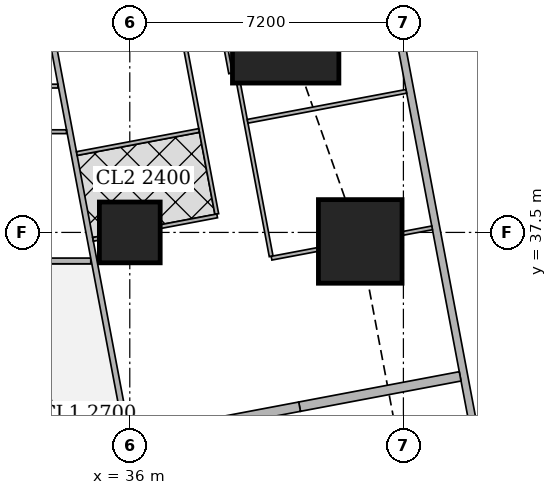
"""IFC4 building model, lengths in metres.
Left out: names, types, materials, properties, quantities, classifications, styles, units other than length and angle.
Written with IfcOpenShell. Run it as: python <this file> out.ifc"""

import sys

from ifc_helpers import new_model, si_unit, direction, frame, frame_2d, origin, origin_2d, place, context, subcontext, project, spatial, rectangle, extrude, element, fill, save


model = new_model("IFC4")
c1 = context("Model", 3, precision=1e-05, world=origin(), true_north=direction((0.0, 1.0)))
c2 = subcontext(c1, "Body", "Model", "MODEL_VIEW")
j1 = project(units=[si_unit("LENGTHUNIT", "METRE"), si_unit("PLANEANGLEUNIT", "RADIAN")], contexts=[c1])
p1 = place(None, origin())
s1 = spatial("IfcSite", under=j1, at=p1, CompositionType="ELEMENT")
p2 = place(p1, origin())
s2 = spatial("IfcBuilding", under=s1, at=p2, CompositionType="ELEMENT")
p3 = place(p2, frame((0.0, 0.0, 100.4)))
s3 = spatial("IfcBuildingStorey", under=s2, at=p3, CompositionType="ELEMENT", Elevation=100.4)
p4 = place(p3, frame((36.0, 37.5, 0.0), z_axis=(0.0, 0.0, 1.0), x_axis=(1.0, 0.0, 0.0)))
e1 = element("IfcColumn", 1, at=p4, inside=s3, PredefinedType="COLUMN", context=c2, shape_type="SweptSolid", body=[
    extrude(rectangle(XDim=1.6, YDim=1.6, at=origin_2d()), origin(), (0.0, 0.0, 1.0), 3.75),
])
p5 = place(p3, frame((42.064, 37.263, 0.0), z_axis=(0.0, 0.0, 1.0), x_axis=(1.0, 0.0, 0.0)))
e2 = element("IfcColumn", 2, at=p5, inside=s3, PredefinedType="COLUMN", context=c2, shape_type="SweptSolid", body=[
    extrude(rectangle(XDim=2.2, YDim=2.2, at=origin_2d()), origin(), (0.0, 0.0, 1.0), 3.75),
])
p6 = place(p3, frame((40.102, 42.83, 0.0), z_axis=(0.0, 0.0, 1.0), x_axis=(1.0, 0.0, 0.0)))
e3 = element("IfcColumn", 3, at=p6, inside=s3, PredefinedType="COLUMN", context=c2, shape_type="SweptSolid", body=[
    extrude(rectangle(XDim=2.8, YDim=2.8, at=origin_2d()), origin(), (0.0, 0.0, 1.0), 3.75),
])
p7 = place(p3, frame((50.653, 2.703, 0.0), z_axis=(0.0, 0.0, 1.0), x_axis=(-0.185612026696, 0.982623109613, 0.0)))
e4 = element("IfcWall", 4, at=p7, inside=s3, PredefinedType="SOLIDWALL", context=c2, shape_type="SweptSolid", body=[
    extrude(rectangle(XDim=41.393, YDim=0.2, at=frame_2d((20.697, 0.0))), origin(), (0.0, 0.0, 1.0), 3.5),
])
p8 = place(p7, frame((1.633, 0.0, 0.9)))
e5 = element("IfcOpeningElement", 5, at=p8, cuts=e4, PredefinedType="OPENING", context=c2, shape_type="SweptSolid", body=[
    extrude(rectangle(XDim=1.8, YDim=1.5, at=frame_2d((0.9, 0.75))), frame((0.0, 0.11, 0.0), z_axis=(0.0, -1.0, 0.0), x_axis=(1.0, 0.0, 0.0)), (0.0, 0.0, 1.0), 0.22),
])
p9 = place(p7, frame((6.032, 0.0, 0.9)))
e6 = element("IfcOpeningElement", 6, at=p9, cuts=e4, PredefinedType="OPENING", context=c2, shape_type="SweptSolid", body=[
    extrude(rectangle(XDim=1.8, YDim=1.5, at=frame_2d((0.9, 0.75))), frame((0.0, 0.11, 0.0), z_axis=(0.0, -1.0, 0.0), x_axis=(1.0, 0.0, 0.0)), (0.0, 0.0, 1.0), 0.22),
])
p10 = place(p7, frame((9.848, 0.0, 0.9)))
e7 = element("IfcOpeningElement", 7, at=p10, cuts=e4, PredefinedType="OPENING", context=c2, shape_type="SweptSolid", body=[
    extrude(rectangle(XDim=1.8, YDim=1.5, at=frame_2d((0.9, 0.75))), frame((0.0, 0.11, 0.0), z_axis=(0.0, -1.0, 0.0), x_axis=(1.0, 0.0, 0.0)), (0.0, 0.0, 1.0), 0.22),
])
p11 = place(p7, frame((13.664, 0.0, 0.9)))
e8 = element("IfcOpeningElement", 8, at=p11, cuts=e4, PredefinedType="OPENING", context=c2, shape_type="SweptSolid", body=[
    extrude(rectangle(XDim=1.8, YDim=1.5, at=frame_2d((0.9, 0.75))), frame((0.0, 0.11, 0.0), z_axis=(0.0, -1.0, 0.0), x_axis=(1.0, 0.0, 0.0)), (0.0, 0.0, 1.0), 0.22),
])
p12 = place(p7, frame((17.481, 0.0, 0.9)))
e9 = element("IfcOpeningElement", 9, at=p12, cuts=e4, PredefinedType="OPENING", context=c2, shape_type="SweptSolid", body=[
    extrude(rectangle(XDim=1.8, YDim=1.5, at=frame_2d((0.9, 0.75))), frame((0.0, 0.11, 0.0), z_axis=(0.0, -1.0, 0.0), x_axis=(1.0, 0.0, 0.0)), (0.0, 0.0, 1.0), 0.22),
])
p13 = place(p7, frame((21.297, 0.0, 0.9)))
e10 = element("IfcOpeningElement", 10, at=p13, cuts=e4, PredefinedType="OPENING", context=c2, shape_type="SweptSolid", body=[
    extrude(rectangle(XDim=1.8, YDim=1.5, at=frame_2d((0.9, 0.75))), frame((0.0, 0.11, 0.0), z_axis=(0.0, -1.0, 0.0), x_axis=(1.0, 0.0, 0.0)), (0.0, 0.0, 1.0), 0.22),
])
p14 = place(p7, frame((25.113, 0.0, 0.9)))
e11 = element("IfcOpeningElement", 11, at=p14, cuts=e4, PredefinedType="OPENING", context=c2, shape_type="SweptSolid", body=[
    extrude(rectangle(XDim=1.8, YDim=1.5, at=frame_2d((0.9, 0.75))), frame((0.0, 0.11, 0.0), z_axis=(0.0, -1.0, 0.0), x_axis=(1.0, 0.0, 0.0)), (0.0, 0.0, 1.0), 0.22),
])
p15 = place(p7, frame((28.93, 0.0, 0.9)))
e12 = element("IfcOpeningElement", 12, at=p15, cuts=e4, PredefinedType="OPENING", context=c2, shape_type="SweptSolid", body=[
    extrude(rectangle(XDim=1.8, YDim=1.5, at=frame_2d((0.9, 0.75))), frame((0.0, 0.11, 0.0), z_axis=(0.0, -1.0, 0.0), x_axis=(1.0, 0.0, 0.0)), (0.0, 0.0, 1.0), 0.22),
])
p16 = place(p7, frame((32.746, 0.0, 0.9)))
e13 = element("IfcOpeningElement", 13, at=p16, cuts=e4, PredefinedType="OPENING", context=c2, shape_type="SweptSolid", body=[
    extrude(rectangle(XDim=1.8, YDim=1.5, at=frame_2d((0.9, 0.75))), frame((0.0, 0.11, 0.0), z_axis=(0.0, -1.0, 0.0), x_axis=(1.0, 0.0, 0.0)), (0.0, 0.0, 1.0), 0.22),
])
p17 = place(p7, frame((36.481, 0.0, 0.9)))
e14 = element("IfcOpeningElement", 14, at=p17, cuts=e4, PredefinedType="OPENING", context=c2, shape_type="SweptSolid", body=[
    extrude(rectangle(XDim=1.8, YDim=1.5, at=frame_2d((0.9, 0.75))), frame((0.0, 0.11, 0.0), z_axis=(0.0, -1.0, 0.0), x_axis=(1.0, 0.0, 0.0)), (0.0, 0.0, 1.0), 0.22),
])
p18 = place(p3, frame((29.601, 36.75, 0.0), z_axis=(0.0, 0.0, 1.0), x_axis=(1.0, 0.0, 0.0)))
e15 = element("IfcWall", 15, at=p18, inside=s3, PredefinedType="SOLIDWALL", context=c2, shape_type="SweptSolid", body=[
    extrude(rectangle(XDim=5.372, YDim=0.15, at=frame_2d((2.686, 0.0))), origin(), (0.0, 0.0, 1.0), 3.5),
])
p19 = place(p3, frame((33.382, 45.65, 0.0), z_axis=(0.0, 0.0, 1.0), x_axis=(0.185593544777, -0.982626600565, 0.0)))
e16 = element("IfcWall", 16, at=p19, inside=s3, PredefinedType="SOLIDWALL", context=c2, shape_type="SweptSolid", body=[
    extrude(rectangle(XDim=47.118, YDim=0.15, at=frame_2d((23.559, 0.0))), origin(), (0.0, 0.0, 1.0), 2.2),
])
p20 = place(p19, frame((10.662, 0.0, 0.0)))
e17 = element("IfcOpeningElement", 17, at=p20, cuts=e16, PredefinedType="OPENING", context=c2, shape_type="SweptSolid", body=[
    extrude(rectangle(XDim=1.0, YDim=2.1, at=frame_2d((0.5, 1.05))), frame((0.0, 0.085, 0.0), z_axis=(0.0, -1.0, 0.0), x_axis=(1.0, 0.0, 0.0)), (0.0, 0.0, 1.0), 0.17),
])
p21 = place(p19, frame((15.237, 0.0, 0.0)))
e18 = element("IfcOpeningElement", 18, at=p21, cuts=e16, PredefinedType="OPENING", context=c2, shape_type="SweptSolid", body=[
    extrude(rectangle(XDim=1.0, YDim=2.1, at=frame_2d((0.5, 1.05))), frame((0.0, 0.085, 0.0), z_axis=(0.0, -1.0, 0.0), x_axis=(1.0, 0.0, 0.0)), (0.0, 0.0, 1.0), 0.17),
])
p22 = place(p19, frame((27.341, 0.0, 0.0)))
e19 = element("IfcOpeningElement", 19, at=p22, cuts=e16, PredefinedType="OPENING", context=c2, shape_type="SweptSolid", body=[
    extrude(rectangle(XDim=1.0, YDim=2.1, at=frame_2d((0.5, 1.05))), frame((0.0, 0.085, 0.0), z_axis=(0.0, -1.0, 0.0), x_axis=(1.0, 0.0, 0.0)), (0.0, 0.0, 1.0), 0.17),
])
p23 = place(p19, frame((33.833, 0.0, 0.0)))
e20 = element("IfcOpeningElement", 20, at=p23, cuts=e16, PredefinedType="OPENING", context=c2, shape_type="SweptSolid", body=[
    extrude(rectangle(XDim=1.0, YDim=2.1, at=frame_2d((0.5, 1.05))), frame((0.0, 0.085, 0.0), z_axis=(0.0, -1.0, 0.0), x_axis=(1.0, 0.0, 0.0)), (0.0, 0.0, 1.0), 0.17),
])
p24 = place(p3, frame((38.654, 41.686, 0.0), z_axis=(0.0, 0.0, 1.0), x_axis=(-0.185676896978, 0.982610853761, 0.0)))
e21 = element("IfcWall", 21, at=p24, inside=s3, PredefinedType="PARTITIONING", context=c2, shape_type="SweptSolid", body=[
    extrude(rectangle(XDim=4.034, YDim=0.1, at=frame_2d((2.017, 0.0))), origin(), (0.0, 0.0, 1.0), 2.05),
])
p25 = place(p3, frame((38.862, 41.42, 0.0), z_axis=(0.0, 0.0, 1.0), x_axis=(0.185332907641, -0.982675792592, 0.0)))
e22 = element("IfcWall", 22, at=p25, inside=s3, PredefinedType="PARTITIONING", context=c2, shape_type="SweptSolid", body=[
    extrude(rectangle(XDim=4.629, YDim=0.1, at=frame_2d((2.314, 0.0))), origin(), (0.0, 0.0, 1.0), 3.5),
])
p26 = place(p25, frame((2.22, 0.0, 0.0)))
e23 = element("IfcOpeningElement", 23, at=p26, cuts=e22, PredefinedType="OPENING", context=c2, shape_type="SweptSolid", body=[
    extrude(rectangle(XDim=0.9, YDim=2.1, at=frame_2d((0.45, 1.05))), frame((0.0, 0.06, 0.0), z_axis=(0.0, -1.0, 0.0), x_axis=(1.0, 0.0, 0.0)), (0.0, 0.0, 1.0), 0.12),
])
p27 = place(p3, frame((37.472, 42.309, 0.0), z_axis=(0.0, 0.0, 1.0), x_axis=(0.185641287362, -0.982617581985, 0.0)))
e24 = element("IfcWall", 24, at=p27, inside=s3, PredefinedType="PARTITIONING", context=c2, shape_type="SweptSolid", body=[
    extrude(rectangle(XDim=4.402, YDim=0.1, at=frame_2d((2.201, 0.0))), origin(), (0.0, 0.0, 1.0), 3.5),
])
p28 = place(p27, frame((2.854, 0.0, 0.0)))
e25 = element("IfcOpeningElement", 25, at=p28, cuts=e24, PredefinedType="OPENING", context=c2, shape_type="SweptSolid", body=[
    extrude(rectangle(XDim=0.9, YDim=2.1, at=frame_2d((0.45, 1.05))), frame((0.0, 0.06, 0.0), z_axis=(0.0, -1.0, 0.0), x_axis=(1.0, 0.0, 0.0)), (0.0, 0.0, 1.0), 0.12),
])
p29 = place(p3, frame((43.277, 41.212, 0.0), z_axis=(0.0, 0.0, 1.0), x_axis=(-0.982665405803, -0.185387972203, 0.0)))
e26 = element("IfcWall", 26, at=p29, inside=s3, PredefinedType="PARTITIONING", context=c2, shape_type="SweptSolid", body=[
    extrude(rectangle(XDim=4.25, YDim=0.1, at=frame_2d((2.125, 0.0))), origin(), (0.0, 0.0, 1.0), 2.05),
])
p30 = place(p3, frame((43.955, 37.62, 0.0), z_axis=(0.0, 0.0, 1.0), x_axis=(-0.98247004097, -0.186420542316, 0.0)))
e27 = element("IfcWall", 27, at=p30, inside=s3, PredefinedType="PARTITIONING", context=c2, shape_type="SweptSolid", body=[
    extrude(rectangle(XDim=0.795, YDim=0.1, at=frame_2d((0.397, 0.0))), origin(), (0.0, 0.0, 1.0), 2.05),
])
p31 = place(p3, frame((40.954, 37.053, 0.0), z_axis=(0.0, 0.0, 1.0), x_axis=(-0.982663001154, -0.185400717808, 0.0)))
e28 = element("IfcWall", 28, at=p31, inside=s3, PredefinedType="PARTITIONING", context=c2, shape_type="SweptSolid", body=[
    extrude(rectangle(XDim=1.246, YDim=0.1, at=frame_2d((0.623, 0.0))), origin(), (0.0, 0.0, 1.0), 2.05),
])
p32 = place(p3, frame((37.823, 40.182, 0.0), z_axis=(0.0, 0.0, 1.0), x_axis=(-0.982664729897, -0.18539155487, 0.0)))
e29 = element("IfcWall", 29, at=p32, inside=s3, PredefinedType="PARTITIONING", context=c2, shape_type="SweptSolid", body=[
    extrude(rectangle(XDim=3.274, YDim=0.1, at=frame_2d((1.637, 0.0))), origin(), (0.0, 0.0, 1.0), 3.5),
])
p33 = place(p3, frame((38.299, 37.935, 0.0), z_axis=(0.0, 0.0, 1.0), x_axis=(-0.982536828695, -0.186068213993, 0.0)))
e30 = element("IfcWall", 30, at=p33, inside=s3, PredefinedType="PARTITIONING", context=c2, shape_type="SweptSolid", body=[
    extrude(rectangle(XDim=1.515, YDim=0.1, at=frame_2d((0.758, 0.0))), origin(), (0.0, 0.0, 1.0), 3.5),
])
p34 = place(p3, frame((35.19, 37.347, 0.0), z_axis=(0.0, 0.0, 1.0), x_axis=(-0.982404955251, -0.186763229514, 0.0)))
e31 = element("IfcWall", 31, at=p34, inside=s3, PredefinedType="PARTITIONING", context=c2, shape_type="SweptSolid", body=[
    extrude(rectangle(XDim=0.161, YDim=0.1, at=frame_2d((0.081, 0.0))), origin(), (0.0, 0.0, 1.0), 3.5),
])
p35 = place(p3, frame((44.693, 33.713, 0.0), z_axis=(0.0, 0.0, 1.0), x_axis=(-0.982633535512, -0.185556823879, 0.0)))
e32 = element("IfcWall", 32, at=p35, inside=s3, PredefinedType="SOLIDWALL", context=c2, shape_type="SweptSolid", body=[
    extrude(rectangle(XDim=4.3, YDim=0.25, at=frame_2d((2.15, 0.0))), origin(), (0.0, 0.0, 1.0), 2.2),
])
p36 = place(p3, frame((40.468, 32.915, 0.0), z_axis=(0.0, 0.0, 1.0), x_axis=(-0.982612837616, -0.185666398014, 0.0)))
e33 = element("IfcWall", 33, at=p36, inside=s3, PredefinedType="SOLIDWALL", context=c2, shape_type="SweptSolid", body=[
    extrude(rectangle(XDim=4.525, YDim=0.25, at=frame_2d((2.262, 0.0))), origin(), (0.0, 0.0, 1.0), 3.5),
])
p37 = place(p3, frame((25.2, 41.35, 0.0), z_axis=(0.0, 0.0, 1.0), x_axis=(1.0, 0.0, 0.0)))
e34 = element("IfcWall", 34, at=p37, inside=s3, PredefinedType="PARTITIONING", context=c2, shape_type="SweptSolid", body=[
    extrude(rectangle(XDim=8.908, YDim=0.1, at=frame_2d((4.454, 0.0))), origin(), (0.0, 0.0, 1.0), 3.5),
])
p38 = place(p37, frame((0.2, 0.0, 0.0)))
e35 = element("IfcOpeningElement", 35, at=p38, cuts=e34, PredefinedType="OPENING", context=c2, shape_type="SweptSolid", body=[
    extrude(rectangle(XDim=0.9, YDim=2.1, at=frame_2d((0.45, 1.05))), frame((0.0, 0.06, 0.0), z_axis=(0.0, -1.0, 0.0), x_axis=(1.0, 0.0, 0.0)), (0.0, 0.0, 1.0), 0.12),
])
p39 = place(p37, frame((3.8, 0.0, 0.0)))
e36 = element("IfcOpeningElement", 36, at=p39, cuts=e34, PredefinedType="OPENING", context=c2, shape_type="SweptSolid", body=[
    extrude(rectangle(XDim=0.9, YDim=2.1, at=frame_2d((0.45, 1.05))), frame((0.0, 0.06, 0.0), z_axis=(0.0, -1.0, 0.0), x_axis=(1.0, 0.0, 0.0)), (0.0, 0.0, 1.0), 0.12),
])
p40 = place(p3, frame((25.2, 40.15, 0.0), z_axis=(0.0, 0.0, 1.0), x_axis=(1.0, 0.0, 0.0)))
e37 = element("IfcWall", 37, at=p40, inside=s3, PredefinedType="PARTITIONING", context=c2, shape_type="SweptSolid", body=[
    extrude(rectangle(XDim=9.135, YDim=0.1, at=frame_2d((4.567, 0.0))), origin(), (0.0, 0.0, 1.0), 3.5),
])
p41 = place(p40, frame((0.655, 0.0, 0.0)))
e38 = element("IfcOpeningElement", 38, at=p41, cuts=e37, PredefinedType="OPENING", context=c2, shape_type="SweptSolid", body=[
    extrude(rectangle(XDim=0.9, YDim=2.1, at=frame_2d((0.45, 1.05))), frame((0.0, 0.06, 0.0), z_axis=(0.0, -1.0, 0.0), x_axis=(1.0, 0.0, 0.0)), (0.0, 0.0, 1.0), 0.12),
])
p42 = place(p40, frame((3.95, 0.0, 0.0)))
e39 = element("IfcOpeningElement", 39, at=p42, cuts=e37, PredefinedType="OPENING", context=c2, shape_type="SweptSolid", body=[
    extrude(rectangle(XDim=0.9, YDim=2.1, at=frame_2d((0.45, 1.05))), frame((0.0, 0.06, 0.0), z_axis=(0.0, -1.0, 0.0), x_axis=(1.0, 0.0, 0.0)), (0.0, 0.0, 1.0), 0.12),
])
p43 = place(p40, frame((8.081, 0.0, 0.0)))
e40 = element("IfcOpeningElement", 40, at=p43, cuts=e37, PredefinedType="OPENING", context=c2, shape_type="SweptSolid", body=[
    extrude(rectangle(XDim=0.9, YDim=2.1, at=frame_2d((0.45, 1.05))), frame((0.0, 0.06, 0.0), z_axis=(0.0, -1.0, 0.0), x_axis=(1.0, 0.0, 0.0)), (0.0, 0.0, 1.0), 0.12),
])
p44 = place(p40, frame((2.455, 0.0, 0.0)))
e41 = element("IfcOpeningElement", 41, at=p44, cuts=e37, PredefinedType="OPENING", context=c2, shape_type="SweptSolid", body=[
    extrude(rectangle(XDim=0.9, YDim=2.1, at=frame_2d((0.45, 1.05))), frame((0.0, 0.06, 0.0), z_axis=(0.0, -1.0, 0.0), x_axis=(1.0, 0.0, 0.0)), (0.0, 0.0, 1.0), 0.12),
])
p45 = place(p40, frame((5.75, 0.0, 0.0)))
e42 = element("IfcOpeningElement", 42, at=p45, cuts=e37, PredefinedType="OPENING", context=c2, shape_type="SweptSolid", body=[
    extrude(rectangle(XDim=0.9, YDim=2.1, at=frame_2d((0.45, 1.05))), frame((0.0, 0.06, 0.0), z_axis=(0.0, -1.0, 0.0), x_axis=(1.0, 0.0, 0.0)), (0.0, 0.0, 1.0), 0.12),
])
p46 = place(p3, frame((38.202, 10.163, 0.0), z_axis=(0.0, 0.0, 1.0), x_axis=(-0.185610321132, 0.982623431783, 0.0)))
e43 = element("IfcWall", 43, at=p46, inside=s3, PredefinedType="PARTITIONING", context=c2, shape_type="SweptSolid", body=[
    extrude(rectangle(XDim=25.111, YDim=0.125, at=frame_2d((12.556, 0.0))), origin(), (0.0, 0.0, 1.0), 2.5),
])
p47 = place(p46, frame((0.708, 0.0, 0.0)))
e44 = element("IfcOpeningElement", 44, at=p47, cuts=e43, PredefinedType="OPENING", context=c2, shape_type="SweptSolid", body=[
    extrude(rectangle(XDim=1.0, YDim=2.1, at=frame_2d((0.5, 1.05))), frame((0.0, 0.073, 0.0), z_axis=(0.0, -1.0, 0.0), x_axis=(1.0, 0.0, 0.0)), (0.0, 0.0, 1.0), 0.145),
])
p48 = place(p46, frame((6.0, 0.0, 0.0)))
e45 = element("IfcOpeningElement", 45, at=p48, cuts=e43, PredefinedType="OPENING", context=c2, shape_type="SweptSolid", body=[
    extrude(rectangle(XDim=1.0, YDim=2.1, at=frame_2d((0.5, 1.05))), frame((0.0, 0.073, 0.0), z_axis=(0.0, -1.0, 0.0), x_axis=(1.0, 0.0, 0.0)), (0.0, 0.0, 1.0), 0.145),
])
p49 = place(p46, frame((13.378, 0.0, 0.0)))
e46 = element("IfcOpeningElement", 46, at=p49, cuts=e43, PredefinedType="OPENING", context=c2, shape_type="SweptSolid", body=[
    extrude(rectangle(XDim=1.0, YDim=2.1, at=frame_2d((0.5, 1.05))), frame((0.0, 0.073, 0.0), z_axis=(0.0, -1.0, 0.0), x_axis=(1.0, 0.0, 0.0)), (0.0, 0.0, 1.0), 0.145),
])
p50 = place(p46, frame((21.25, 0.0, 0.0)))
e47 = element("IfcOpeningElement", 47, at=p50, cuts=e43, PredefinedType="OPENING", context=c2, shape_type="SweptSolid", body=[
    extrude(rectangle(XDim=1.0, YDim=2.1, at=frame_2d((0.5, 1.05))), frame((0.0, 0.073, 0.0), z_axis=(0.0, -1.0, 0.0), x_axis=(1.0, 0.0, 0.0)), (0.0, 0.0, 1.0), 0.145),
])
p51 = place(p15, origin())
e48 = element("IfcWindow", 48, at=p51, inside=s3, PartitioningType="SINGLE_PANEL", PredefinedType="WINDOW", context=c2, shape_type="SweptSolid", body=[
    extrude(rectangle(XDim=1.8, YDim=1.5, at=frame_2d((0.9, 0.75))), frame((0.0, 0.03, 0.0), z_axis=(0.0, -1.0, 0.0), x_axis=(1.0, 0.0, 0.0)), (0.0, 0.0, 1.0), 0.06),
])
fill(e12, e48)
p52 = place(p16, origin())
e49 = element("IfcWindow", 49, at=p52, inside=s3, PartitioningType="SINGLE_PANEL", PredefinedType="WINDOW", context=c2, shape_type="SweptSolid", body=[
    extrude(rectangle(XDim=1.8, YDim=1.5, at=frame_2d((0.9, 0.75))), frame((0.0, 0.03, 0.0), z_axis=(0.0, -1.0, 0.0), x_axis=(1.0, 0.0, 0.0)), (0.0, 0.0, 1.0), 0.06),
])
fill(e13, e49)
p53 = place(p17, origin())
e50 = element("IfcWindow", 50, at=p53, inside=s3, PartitioningType="SINGLE_PANEL", PredefinedType="WINDOW", context=c2, shape_type="SweptSolid", body=[
    extrude(rectangle(XDim=1.8, YDim=1.5, at=frame_2d((0.9, 0.75))), frame((0.0, 0.03, 0.0), z_axis=(0.0, -1.0, 0.0), x_axis=(1.0, 0.0, 0.0)), (0.0, 0.0, 1.0), 0.06),
])
fill(e14, e50)
p54 = place(p26, origin())
e51 = element("IfcDoor", 51, at=p54, inside=s3, OperationType="SINGLE_SWING_LEFT", PredefinedType="DOOR", context=c2, shape_type="SweptSolid", body=[
    extrude(rectangle(XDim=0.9, YDim=2.1, at=frame_2d((0.45, 1.05))), frame((0.0, 0.025, 0.0), z_axis=(0.0, -1.0, 0.0), x_axis=(1.0, 0.0, 0.0)), (0.0, 0.0, 1.0), 0.05),
])
fill(e23, e51)
p55 = place(p28, origin())
e52 = element("IfcDoor", 52, at=p55, inside=s3, OperationType="SINGLE_SWING_LEFT", PredefinedType="DOOR", context=c2, shape_type="SweptSolid", body=[
    extrude(rectangle(XDim=0.9, YDim=2.1, at=frame_2d((0.45, 1.05))), frame((0.0, 0.025, 0.0), z_axis=(0.0, -1.0, 0.0), x_axis=(1.0, 0.0, 0.0)), (0.0, 0.0, 1.0), 0.05),
])
fill(e25, e52)
p56 = place(p20, origin())
e53 = element("IfcDoor", 53, at=p56, inside=s3, OperationType="SINGLE_SWING_RIGHT", PredefinedType="DOOR", context=c2, shape_type="SweptSolid", body=[
    extrude(rectangle(XDim=1.0, YDim=2.1, at=frame_2d((0.5, 1.05))), frame((0.0, 0.025, 0.0), z_axis=(0.0, -1.0, 0.0), x_axis=(1.0, 0.0, 0.0)), (0.0, 0.0, 1.0), 0.05),
])
fill(e17, e53)
p57 = place(p43, origin())
e54 = element("IfcDoor", 54, at=p57, inside=s3, OperationType="SINGLE_SWING_LEFT", PredefinedType="DOOR", context=c2, shape_type="SweptSolid", body=[
    extrude(rectangle(XDim=0.9, YDim=2.1, at=frame_2d((0.45, 1.05))), frame((0.0, 0.025, 0.0), z_axis=(0.0, -1.0, 0.0), x_axis=(1.0, 0.0, 0.0)), (0.0, 0.0, 1.0), 0.05),
])
fill(e40, e54)
save(model, sys.argv[1])
